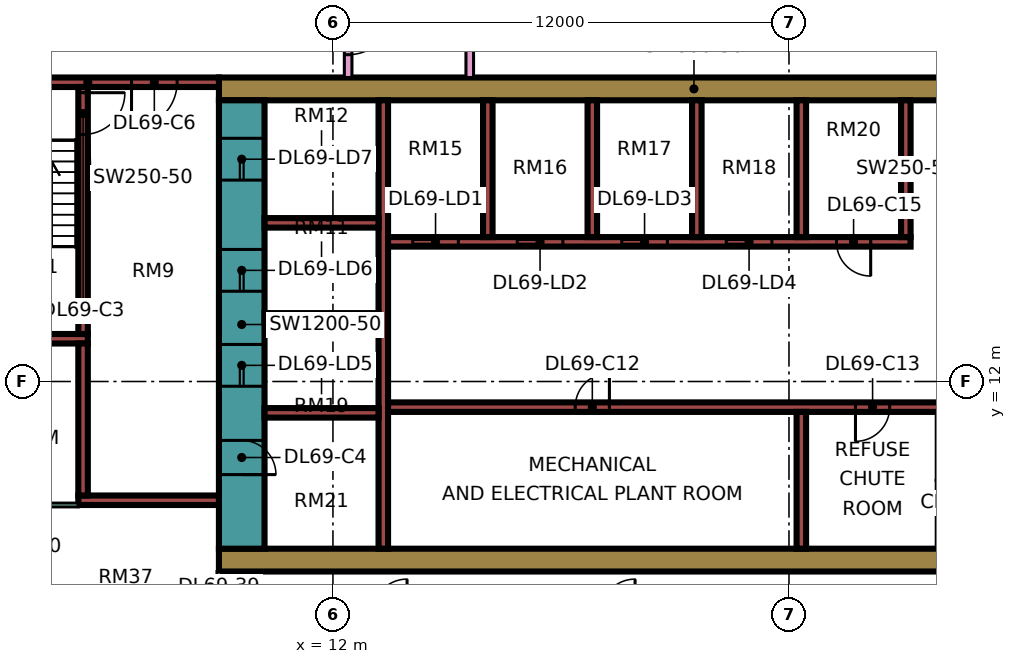
"""IFC4 building model, lengths in metres.
Left out: names, types, materials, properties, quantities, classifications, styles, units other than length and angle.
Written with IfcOpenShell. Run it as: python <this file> out.ifc"""

import sys

from ifc_helpers import new_model, si_unit, direction, frame, frame_2d, origin, place, context, subcontext, project, spatial, rectangle, extrude, element, fill, save


model = new_model("IFC4")
c1 = context("Model", 3, precision=1e-05, world=origin(), true_north=direction((0.0, 1.0)))
c2 = subcontext(c1, "Body", "Model", "MODEL_VIEW")
j1 = project(units=[si_unit("LENGTHUNIT", "METRE"), si_unit("PLANEANGLEUNIT", "RADIAN")], contexts=[c1])
p1 = place(None, origin())
s1 = spatial("IfcSite", under=j1, at=p1, CompositionType="ELEMENT")
p2 = place(p1, origin())
s2 = spatial("IfcBuilding", under=s1, at=p2, CompositionType="ELEMENT")
p3 = place(p2, frame((0.0, 0.0, 295.9)))
s3 = spatial("IfcBuildingStorey", under=s2, at=p3, CompositionType="ELEMENT", Elevation=295.9)
p4 = place(p3, frame((9.0, 7.3, 0.0), z_axis=(0.0, 0.0, 1.0), x_axis=(1.0, 0.0, 0.0)))
e1 = element("IfcWall", 1, at=p4, inside=s3, PredefinedType="SHEAR", context=c2, shape_type="SweptSolid", body=[
    extrude(rectangle(XDim=25.0, YDim=0.6, at=frame_2d((12.5, 0.0))), origin(), (0.0, 0.0, 1.0), 3.75),
])
p5 = place(p3, frame((9.0, 19.7, 0.0), z_axis=(0.0, 0.0, 1.0), x_axis=(1.0, 0.0, 0.0)))
e2 = element("IfcWall", 2, at=p5, inside=s3, PredefinedType="SHEAR", context=c2, shape_type="SweptSolid", body=[
    extrude(rectangle(XDim=25.0, YDim=0.6, at=frame_2d((12.5, 0.0))), origin(), (0.0, 0.0, 1.0), 3.75),
])
p6 = place(p5, frame((19.1, 0.0, 0.0)))
e3 = element("IfcOpeningElement", 3, at=p6, cuts=e2, PredefinedType="OPENING", context=c2, shape_type="SweptSolid", body=[
    extrude(rectangle(XDim=1.8, YDim=2.4, at=frame_2d((0.9, 1.2))), frame((0.0, 0.31, 0.0), z_axis=(0.0, -1.0, 0.0), x_axis=(1.0, 0.0, 0.0)), (0.0, 0.0, 1.0), 0.62),
])
p7 = place(p3, frame((9.6, 7.6, 0.0), z_axis=(0.0, 0.0, 1.0), x_axis=(0.0, 1.0, 0.0)))
e4 = element("IfcWall", 4, at=p7, inside=s3, PredefinedType="SHEAR", context=c2, shape_type="SweptSolid", body=[
    extrude(rectangle(XDim=11.8, YDim=1.2, at=frame_2d((5.9, 0.0))), origin(), (0.0, 0.0, 1.0), 3.75),
])
p8 = place(p7, frame((4.275, 0.0, 0.0)))
e5 = element("IfcOpeningElement", 5, at=p8, cuts=e4, PredefinedType="OPENING", context=c2, shape_type="SweptSolid", body=[
    extrude(rectangle(XDim=1.1, YDim=2.2, at=frame_2d((0.55, 1.1))), frame((0.0, 0.61, 0.0), z_axis=(0.0, -1.0, 0.0), x_axis=(1.0, 0.0, 0.0)), (0.0, 0.0, 1.0), 1.22),
])
p9 = place(p7, frame((6.775, 0.0, 0.0)))
e6 = element("IfcOpeningElement", 6, at=p9, cuts=e4, PredefinedType="OPENING", context=c2, shape_type="SweptSolid", body=[
    extrude(rectangle(XDim=1.1, YDim=2.2, at=frame_2d((0.55, 1.1))), frame((0.0, 0.61, 0.0), z_axis=(0.0, -1.0, 0.0), x_axis=(1.0, 0.0, 0.0)), (0.0, 0.0, 1.0), 1.22),
])
p10 = place(p7, frame((9.7, 0.0, 0.0)))
e7 = element("IfcOpeningElement", 7, at=p10, cuts=e4, PredefinedType="OPENING", context=c2, shape_type="SweptSolid", body=[
    extrude(rectangle(XDim=1.1, YDim=2.2, at=frame_2d((0.55, 1.1))), frame((0.0, 0.61, 0.0), z_axis=(0.0, -1.0, 0.0), x_axis=(1.0, 0.0, 0.0)), (0.0, 0.0, 1.0), 1.22),
])
p11 = place(p7, frame((1.95, 0.0, 0.0)))
e8 = element("IfcOpeningElement", 8, at=p11, cuts=e4, PredefinedType="OPENING", context=c2, shape_type="SweptSolid", body=[
    extrude(rectangle(XDim=0.9, YDim=2.1, at=frame_2d((0.45, 1.05))), frame((0.0, 0.61, 0.0), z_axis=(0.0, -1.0, 0.0), x_axis=(1.0, 0.0, 0.0)), (0.0, 0.0, 1.0), 1.22),
])
p12 = place(p3, frame((13.325, 7.6, 0.0), z_axis=(0.0, 0.0, 1.0), x_axis=(0.0, 1.0, 0.0)))
e9 = element("IfcWall", 9, at=p12, inside=s3, PredefinedType="SHEAR", context=c2, shape_type="SweptSolid", body=[
    extrude(rectangle(XDim=11.8, YDim=0.25, at=frame_2d((5.9, 0.0))), origin(), (0.0, 0.0, 1.0), 3.75),
])
p13 = place(p3, frame((13.45, 11.325, 0.0), z_axis=(0.0, 0.0, 1.0), x_axis=(1.0, 0.0, 0.0)))
e10 = element("IfcWall", 10, at=p13, inside=s3, PredefinedType="SHEAR", context=c2, shape_type="SweptSolid", body=[
    extrude(rectangle(XDim=19.95, YDim=0.25, at=frame_2d((9.975, 0.0))), origin(), (0.0, 0.0, 1.0), 3.75),
])
p14 = place(p13, frame((4.925, 0.0, 0.0)))
e11 = element("IfcOpeningElement", 11, at=p14, cuts=e10, PredefinedType="OPENING", context=c2, shape_type="SweptSolid", body=[
    extrude(rectangle(XDim=0.9, YDim=2.1, at=frame_2d((0.45, 1.05))), frame((0.0, 0.135, 0.0), z_axis=(0.0, -1.0, 0.0), x_axis=(1.0, 0.0, 0.0)), (0.0, 0.0, 1.0), 0.27),
])
p15 = place(p13, frame((12.3, 0.0, 0.0)))
e12 = element("IfcOpeningElement", 12, at=p15, cuts=e10, PredefinedType="OPENING", context=c2, shape_type="SweptSolid", body=[
    extrude(rectangle(XDim=0.9, YDim=2.1, at=frame_2d((0.45, 1.05))), frame((0.0, 0.135, 0.0), z_axis=(0.0, -1.0, 0.0), x_axis=(1.0, 0.0, 0.0)), (0.0, 0.0, 1.0), 0.27),
])
p16 = place(p13, frame((16.775, 0.0, 0.0)))
e13 = element("IfcOpeningElement", 13, at=p16, cuts=e10, PredefinedType="OPENING", context=c2, shape_type="SweptSolid", body=[
    extrude(rectangle(XDim=0.9, YDim=2.1, at=frame_2d((0.45, 1.05))), frame((0.0, 0.135, 0.0), z_axis=(0.0, -1.0, 0.0), x_axis=(1.0, 0.0, 0.0)), (0.0, 0.0, 1.0), 0.27),
])
p17 = place(p3, frame((13.45, 15.675, 0.0), z_axis=(0.0, 0.0, 1.0), x_axis=(1.0, 0.0, 0.0)))
e14 = element("IfcWall", 14, at=p17, inside=s3, PredefinedType="SHEAR", context=c2, shape_type="SweptSolid", body=[
    extrude(rectangle(XDim=13.75, YDim=0.25, at=frame_2d((6.875, 0.0))), origin(), (0.0, 0.0, 1.0), 3.75),
])
p18 = place(p17, frame((0.65, 0.0, 0.0)))
e15 = element("IfcOpeningElement", 15, at=p18, cuts=e14, PredefinedType="OPENING", context=c2, shape_type="SweptSolid", body=[
    extrude(rectangle(XDim=1.2, YDim=2.2, at=frame_2d((0.6, 1.1))), frame((0.0, 0.135, 0.0), z_axis=(0.0, -1.0, 0.0), x_axis=(1.0, 0.0, 0.0)), (0.0, 0.0, 1.0), 0.27),
])
p19 = place(p17, frame((3.4, 0.0, 0.0)))
e16 = element("IfcOpeningElement", 16, at=p19, cuts=e14, PredefinedType="OPENING", context=c2, shape_type="SweptSolid", body=[
    extrude(rectangle(XDim=1.2, YDim=2.2, at=frame_2d((0.6, 1.1))), frame((0.0, 0.135, 0.0), z_axis=(0.0, -1.0, 0.0), x_axis=(1.0, 0.0, 0.0)), (0.0, 0.0, 1.0), 0.27),
])
p20 = place(p17, frame((6.15, 0.0, 0.0)))
e17 = element("IfcOpeningElement", 17, at=p20, cuts=e14, PredefinedType="OPENING", context=c2, shape_type="SweptSolid", body=[
    extrude(rectangle(XDim=1.2, YDim=2.2, at=frame_2d((0.6, 1.1))), frame((0.0, 0.135, 0.0), z_axis=(0.0, -1.0, 0.0), x_axis=(1.0, 0.0, 0.0)), (0.0, 0.0, 1.0), 0.27),
])
p21 = place(p17, frame((8.9, 0.0, 0.0)))
e18 = element("IfcOpeningElement", 18, at=p21, cuts=e14, PredefinedType="OPENING", context=c2, shape_type="SweptSolid", body=[
    extrude(rectangle(XDim=1.2, YDim=2.2, at=frame_2d((0.6, 1.1))), frame((0.0, 0.135, 0.0), z_axis=(0.0, -1.0, 0.0), x_axis=(1.0, 0.0, 0.0)), (0.0, 0.0, 1.0), 0.27),
])
p22 = place(p17, frame((11.8, 0.0, 0.0)))
e19 = element("IfcOpeningElement", 19, at=p22, cuts=e14, PredefinedType="OPENING", context=c2, shape_type="SweptSolid", body=[
    extrude(rectangle(XDim=0.9, YDim=2.1, at=frame_2d((0.45, 1.05))), frame((0.0, 0.135, 0.0), z_axis=(0.0, -1.0, 0.0), x_axis=(1.0, 0.0, 0.0)), (0.0, 0.0, 1.0), 0.27),
])
for number, where, z_axis, x_axis in (
    (20, (10.2, 11.175, 0.0), (0.0, 0.0, 1.0), (1.0, 0.0, 0.0)),
    (21, (10.2, 13.675, 0.0), (0.0, 0.0, 1.0), (1.0, 0.0, 0.0)),
    (22, (10.2, 16.175, 0.0), (0.0, 0.0, 1.0), (1.0, 0.0, 0.0)),
):
    element("IfcWall", number, at=place(p3, frame(where, z_axis=z_axis, x_axis=x_axis)), inside=s3, PredefinedType="SHEAR", context=c2, shape_type="SweptSolid", body=[
        extrude(rectangle(XDim=3.0, YDim=0.25, at=frame_2d((1.5, 0.0))), origin(), (0.0, 0.0, 1.0), 3.75),
    ])
for number, where, z_axis, x_axis in (
    (23, (24.325, 7.6, 0.0), (0.0, 0.0, 1.0), (0.0, 1.0, 0.0)),
    (24, (16.075, 15.8, 0.0), (0.0, 0.0, 1.0), (0.0, 1.0, 0.0)),
    (25, (18.825, 15.8, 0.0), (0.0, 0.0, 1.0), (0.0, 1.0, 0.0)),
    (26, (21.575, 15.8, 0.0), (0.0, 0.0, 1.0), (0.0, 1.0, 0.0)),
    (27, (24.325, 15.8, 0.0), (0.0, 0.0, 1.0), (0.0, 1.0, 0.0)),
    (28, (27.075, 15.8, 0.0), (0.0, 0.0, 1.0), (0.0, 1.0, 0.0)),
):
    element("IfcWall", number, at=place(p3, frame(where, z_axis=z_axis, x_axis=x_axis)), inside=s3, PredefinedType="SHEAR", context=c2, shape_type="SweptSolid", body=[
        extrude(rectangle(XDim=3.6, YDim=0.25, at=frame_2d((1.8, 0.0))), origin(), (0.0, 0.0, 1.0), 3.75),
    ])
p23 = place(p3, frame((2.1, 19.875, 0.0), z_axis=(0.0, 0.0, 1.0), x_axis=(1.0, 0.0, 0.0)))
e29 = element("IfcWall", 29, at=p23, inside=s3, PredefinedType="SHEAR", context=c2, shape_type="SweptSolid", body=[
    extrude(rectangle(XDim=6.9, YDim=0.25, at=frame_2d((3.45, 0.0))), origin(), (0.0, 0.0, 1.0), 3.75),
])
p24 = place(p23, frame((1.175, 0.0, 0.0)))
e30 = element("IfcOpeningElement", 30, at=p24, cuts=e29, PredefinedType="OPENING", context=c2, shape_type="SweptSolid", body=[
    extrude(rectangle(XDim=1.1, YDim=2.2, at=frame_2d((0.55, 1.1))), frame((0.0, 0.135, 0.0), z_axis=(0.0, -1.0, 0.0), x_axis=(1.0, 0.0, 0.0)), (0.0, 0.0, 1.0), 0.27),
])
p25 = place(p23, frame((4.6, 0.0, 0.0)))
e31 = element("IfcOpeningElement", 31, at=p25, cuts=e29, PredefinedType="OPENING", context=c2, shape_type="SweptSolid", body=[
    extrude(rectangle(XDim=1.2, YDim=2.2, at=frame_2d((0.6, 1.1))), frame((0.0, 0.135, 0.0), z_axis=(0.0, -1.0, 0.0), x_axis=(1.0, 0.0, 0.0)), (0.0, 0.0, 1.0), 0.27),
])
p26 = place(p3, frame((2.1, 13.125, 0.0), z_axis=(0.0, 0.0, 1.0), x_axis=(1.0, 0.0, 0.0)))
e32 = element("IfcWall", 32, at=p26, inside=s3, PredefinedType="SHEAR", context=c2, shape_type="SweptSolid", body=[
    extrude(rectangle(XDim=3.45, YDim=0.25, at=frame_2d((1.725, 0.0))), origin(), (0.0, 0.0, 1.0), 3.75),
])
p27 = place(p3, frame((5.425, 13.25, 0.0), z_axis=(0.0, 0.0, 1.0), x_axis=(0.0, 1.0, 0.0)))
e33 = element("IfcWall", 33, at=p27, inside=s3, PredefinedType="SHEAR", context=c2, shape_type="SweptSolid", body=[
    extrude(rectangle(XDim=6.5, YDim=0.25, at=frame_2d((3.25, 0.0))), origin(), (0.0, 0.0, 1.0), 3.75),
])
p28 = place(p27, frame((5.25, 0.0, 0.0)))
e34 = element("IfcOpeningElement", 34, at=p28, cuts=e33, PredefinedType="OPENING", context=c2, shape_type="SweptSolid", body=[
    extrude(rectangle(XDim=1.1, YDim=2.2, at=frame_2d((0.55, 1.1))), frame((0.0, 0.135, 0.0), z_axis=(0.0, -1.0, 0.0), x_axis=(1.0, 0.0, 0.0)), (0.0, 0.0, 1.0), 0.27),
])
p29 = place(p3, frame((5.3, 8.875, 0.0), z_axis=(0.0, 0.0, 1.0), x_axis=(1.0, 0.0, 0.0)))
e35 = element("IfcWall", 35, at=p29, inside=s3, PredefinedType="SHEAR", context=c2, shape_type="SweptSolid", body=[
    extrude(rectangle(XDim=3.7, YDim=0.25, at=frame_2d((1.85, 0.0))), origin(), (0.0, 0.0, 1.0), 3.75),
])
p30 = place(p3, frame((5.425, 9.0, 0.0), z_axis=(0.0, 0.0, 1.0), x_axis=(0.0, 1.0, 0.0)))
e36 = element("IfcWall", 36, at=p30, inside=s3, PredefinedType="SHEAR", context=c2, shape_type="SweptSolid", body=[
    extrude(rectangle(XDim=4.0, YDim=0.25, at=frame_2d((2.0, 0.0))), origin(), (0.0, 0.0, 1.0), 3.75),
])
p31 = place(p3, frame((-1.447, 12.553, 0.0), z_axis=(0.0, 0.0, 1.0), x_axis=(0.707106781187, -0.707106781187, 0.0)))
e37 = element("IfcWall", 37, at=p31, inside=s3, PredefinedType="SOLIDWALL", context=c2, shape_type="SweptSolid", body=[
    extrude(rectangle(XDim=19.799, YDim=0.15, at=frame_2d((9.899, 0.0))), origin(), (0.0, 0.0, 1.0), 3.35),
])
p32 = place(p31, frame((2.212, 0.0, 0.45)))
e38 = element("IfcOpeningElement", 38, at=p32, cuts=e37, PredefinedType="OPENING", context=c2, shape_type="SweptSolid", body=[
    extrude(rectangle(XDim=3.0, YDim=2.4, at=frame_2d((1.5, 1.2))), frame((0.0, 0.085, 0.0), z_axis=(0.0, -1.0, 0.0), x_axis=(1.0, 0.0, 0.0)), (0.0, 0.0, 1.0), 0.17),
])
p33 = place(p31, frame((10.216, 0.0, 0.45)))
e39 = element("IfcOpeningElement", 39, at=p33, cuts=e37, PredefinedType="OPENING", context=c2, shape_type="SweptSolid", body=[
    extrude(rectangle(XDim=3.0, YDim=2.4, at=frame_2d((1.5, 1.2))), frame((0.0, 0.085, 0.0), z_axis=(0.0, -1.0, 0.0), x_axis=(1.0, 0.0, 0.0)), (0.0, 0.0, 1.0), 0.17),
])
p34 = place(p3, frame((2.461, 8.75, 0.0), z_axis=(0.0, 0.0, 1.0), x_axis=(1.0, 0.0, 0.0)))
e40 = element("IfcWall", 40, at=p34, inside=s3, PredefinedType="PARTITIONING", context=c2, shape_type="SweptSolid", body=[
    extrude(rectangle(XDim=2.839, YDim=0.1, at=frame_2d((1.419, 0.0))), origin(), (0.0, 0.0, 1.0), 3.35),
])
p35 = place(p34, frame((0.889, 0.0, 0.0)))
e41 = element("IfcOpeningElement", 41, at=p35, cuts=e40, PredefinedType="OPENING", context=c2, shape_type="SweptSolid", body=[
    extrude(rectangle(XDim=0.9, YDim=2.1, at=frame_2d((0.45, 1.05))), frame((0.0, 0.06, 0.0), z_axis=(0.0, -1.0, 0.0), x_axis=(1.0, 0.0, 0.0)), (0.0, 0.0, 1.0), 0.12),
])
p36 = place(p3, frame((9.0, 3.95, 0.0), z_axis=(0.0, 0.0, 1.0), x_axis=(0.0, 1.0, 0.0)))
e42 = element("IfcWall", 42, at=p36, inside=s3, PredefinedType="PARTITIONING", context=c2, shape_type="SweptSolid", body=[
    extrude(rectangle(XDim=3.05, YDim=0.1, at=frame_2d((1.525, 0.0))), origin(), (0.0, 0.0, 1.0), 3.35),
])
p37 = place(p36, frame((1.1, 0.0, 0.0)))
e43 = element("IfcOpeningElement", 43, at=p37, cuts=e42, PredefinedType="OPENING", context=c2, shape_type="SweptSolid", body=[
    extrude(rectangle(XDim=0.9, YDim=2.1, at=frame_2d((0.45, 1.05))), frame((0.0, 0.06, 0.0), z_axis=(0.0, -1.0, 0.0), x_axis=(1.0, 0.0, 0.0)), (0.0, 0.0, 1.0), 0.12),
])
p38 = place(p3, frame((12.4, 20.0, 0.0), z_axis=(0.0, 0.0, 1.0), x_axis=(0.0, 1.0, 0.0)))
e44 = element("IfcWall", 44, at=p38, inside=s3, PredefinedType="PARTITIONING", context=c2, shape_type="SweptSolid", body=[
    extrude(rectangle(XDim=33.926, YDim=0.2, at=frame_2d((16.963, 0.0))), origin(), (0.0, 0.0, 1.0), 3.35),
])
p39 = place(p38, frame((32.1, 0.0, 0.0)))
e45 = element("IfcOpeningElement", 45, at=p39, cuts=e44, PredefinedType="OPENING", context=c2, shape_type="SweptSolid", body=[
    extrude(rectangle(XDim=1.0, YDim=2.1, at=frame_2d((0.5, 1.05))), frame((0.0, 0.11, 0.0), z_axis=(0.0, -1.0, 0.0), x_axis=(1.0, 0.0, 0.0)), (0.0, 0.0, 1.0), 0.22),
])
p40 = place(p38, frame((0.6, 0.0, 0.0)))
e46 = element("IfcOpeningElement", 46, at=p40, cuts=e44, PredefinedType="OPENING", context=c2, shape_type="SweptSolid", body=[
    extrude(rectangle(XDim=1.2, YDim=2.1, at=frame_2d((0.6, 1.05))), frame((0.0, 0.11, 0.0), z_axis=(0.0, -1.0, 0.0), x_axis=(1.0, 0.0, 0.0)), (0.0, 0.0, 1.0), 0.22),
])
p41 = place(p38, frame((14.1, 0.0, 0.0)))
e47 = element("IfcOpeningElement", 47, at=p41, cuts=e44, PredefinedType="OPENING", context=c2, shape_type="SweptSolid", body=[
    extrude(rectangle(XDim=1.0, YDim=2.1, at=frame_2d((0.5, 1.05))), frame((0.0, 0.11, 0.0), z_axis=(0.0, -1.0, 0.0), x_axis=(1.0, 0.0, 0.0)), (0.0, 0.0, 1.0), 0.22),
])
p42 = place(p3, frame((15.6, 20.0, 0.0), z_axis=(0.0, 0.0, 1.0), x_axis=(0.0, 1.0, 0.0)))
e48 = element("IfcWall", 48, at=p42, inside=s3, PredefinedType="PARTITIONING", context=c2, shape_type="SweptSolid", body=[
    extrude(rectangle(XDim=27.775, YDim=0.2, at=frame_2d((13.887, 0.0))), origin(), (0.0, 0.0, 1.0), 3.35),
])
p43 = place(p42, frame((6.55, 0.0, 0.0)))
e49 = element("IfcOpeningElement", 49, at=p43, cuts=e48, PredefinedType="OPENING", context=c2, shape_type="SweptSolid", body=[
    extrude(rectangle(XDim=1.0, YDim=2.1, at=frame_2d((0.5, 1.05))), frame((0.0, 0.11, 0.0), z_axis=(0.0, -1.0, 0.0), x_axis=(1.0, 0.0, 0.0)), (0.0, 0.0, 1.0), 0.22),
])
p44 = place(p42, frame((12.25, 0.0, 0.0)))
e50 = element("IfcOpeningElement", 50, at=p44, cuts=e48, PredefinedType="OPENING", context=c2, shape_type="SweptSolid", body=[
    extrude(rectangle(XDim=1.6, YDim=2.1, at=frame_2d((0.8, 1.05))), frame((0.0, 0.11, 0.0), z_axis=(0.0, -1.0, 0.0), x_axis=(1.0, 0.0, 0.0)), (0.0, 0.0, 1.0), 0.22),
])
p45 = place(p42, frame((17.2, 0.0, 0.0)))
e51 = element("IfcOpeningElement", 51, at=p45, cuts=e48, PredefinedType="OPENING", context=c2, shape_type="SweptSolid", body=[
    extrude(rectangle(XDim=1.0, YDim=2.1, at=frame_2d((0.5, 1.05))), frame((0.0, 0.11, 0.0), z_axis=(0.0, -1.0, 0.0), x_axis=(1.0, 0.0, 0.0)), (0.0, 0.0, 1.0), 0.22),
])
p46 = place(p42, frame((1.15, 0.0, 0.0)))
e52 = element("IfcOpeningElement", 52, at=p46, cuts=e48, PredefinedType="OPENING", context=c2, shape_type="SweptSolid", body=[
    extrude(rectangle(XDim=1.8, YDim=2.1, at=frame_2d((0.9, 1.05))), frame((0.0, 0.11, 0.0), z_axis=(0.0, -1.0, 0.0), x_axis=(1.0, 0.0, 0.0)), (0.0, 0.0, 1.0), 0.22),
])
p47 = place(p42, frame((25.9, 0.0, 0.0)))
e53 = element("IfcOpeningElement", 53, at=p47, cuts=e48, PredefinedType="OPENING", context=c2, shape_type="SweptSolid", body=[
    extrude(rectangle(XDim=1.0, YDim=2.1, at=frame_2d((0.5, 1.05))), frame((0.0, 0.11, 0.0), z_axis=(0.0, -1.0, 0.0), x_axis=(1.0, 0.0, 0.0)), (0.0, 0.0, 1.0), 0.22),
])
p48 = place(p18, origin())
e54 = element("IfcDoor", 54, at=p48, inside=s3, OperationType="DOUBLE_DOOR_SLIDING", PredefinedType="DOOR", context=c2, shape_type="SweptSolid", body=[
    extrude(rectangle(XDim=1.2, YDim=2.2, at=frame_2d((0.6, 1.1))), frame((0.0, 0.025, 0.0), z_axis=(0.0, -1.0, 0.0), x_axis=(1.0, 0.0, 0.0)), (0.0, 0.0, 1.0), 0.05),
])
fill(e15, e54)
p49 = place(p19, origin())
e55 = element("IfcDoor", 55, at=p49, inside=s3, OperationType="DOUBLE_DOOR_SLIDING", PredefinedType="DOOR", context=c2, shape_type="SweptSolid", body=[
    extrude(rectangle(XDim=1.2, YDim=2.2, at=frame_2d((0.6, 1.1))), frame((0.0, 0.025, 0.0), z_axis=(0.0, -1.0, 0.0), x_axis=(1.0, 0.0, 0.0)), (0.0, 0.0, 1.0), 0.05),
])
fill(e16, e55)
p50 = place(p20, origin())
e56 = element("IfcDoor", 56, at=p50, inside=s3, OperationType="DOUBLE_DOOR_SLIDING", PredefinedType="DOOR", context=c2, shape_type="SweptSolid", body=[
    extrude(rectangle(XDim=1.2, YDim=2.2, at=frame_2d((0.6, 1.1))), frame((0.0, 0.025, 0.0), z_axis=(0.0, -1.0, 0.0), x_axis=(1.0, 0.0, 0.0)), (0.0, 0.0, 1.0), 0.05),
])
fill(e17, e56)
p51 = place(p21, origin())
e57 = element("IfcDoor", 57, at=p51, inside=s3, OperationType="DOUBLE_DOOR_SLIDING", PredefinedType="DOOR", context=c2, shape_type="SweptSolid", body=[
    extrude(rectangle(XDim=1.2, YDim=2.2, at=frame_2d((0.6, 1.1))), frame((0.0, 0.025, 0.0), z_axis=(0.0, -1.0, 0.0), x_axis=(1.0, 0.0, 0.0)), (0.0, 0.0, 1.0), 0.05),
])
fill(e18, e57)
p52 = place(p8, origin())
e58 = element("IfcDoor", 58, at=p52, inside=s3, OperationType="DOUBLE_DOOR_SLIDING", PredefinedType="DOOR", context=c2, shape_type="SweptSolid", body=[
    extrude(rectangle(XDim=1.1, YDim=2.2, at=frame_2d((0.55, 1.1))), frame((0.0, 0.025, 0.0), z_axis=(0.0, -1.0, 0.0), x_axis=(1.0, 0.0, 0.0)), (0.0, 0.0, 1.0), 0.05),
])
fill(e5, e58)
p53 = place(p9, origin())
e59 = element("IfcDoor", 59, at=p53, inside=s3, OperationType="DOUBLE_DOOR_SLIDING", PredefinedType="DOOR", context=c2, shape_type="SweptSolid", body=[
    extrude(rectangle(XDim=1.1, YDim=2.2, at=frame_2d((0.55, 1.1))), frame((0.0, 0.025, 0.0), z_axis=(0.0, -1.0, 0.0), x_axis=(1.0, 0.0, 0.0)), (0.0, 0.0, 1.0), 0.05),
])
fill(e6, e59)
p54 = place(p10, origin())
e60 = element("IfcDoor", 60, at=p54, inside=s3, OperationType="DOUBLE_DOOR_SLIDING", PredefinedType="DOOR", context=c2, shape_type="SweptSolid", body=[
    extrude(rectangle(XDim=1.1, YDim=2.2, at=frame_2d((0.55, 1.1))), frame((0.0, 0.025, 0.0), z_axis=(0.0, -1.0, 0.0), x_axis=(1.0, 0.0, 0.0)), (0.0, 0.0, 1.0), 0.05),
])
fill(e7, e60)
p55 = place(p28, origin())
e61 = element("IfcDoor", 61, at=p55, inside=s3, OperationType="SINGLE_SWING_RIGHT", PredefinedType="DOOR", context=c2, shape_type="SweptSolid", body=[
    extrude(rectangle(XDim=1.1, YDim=2.2, at=frame_2d((0.55, 1.1))), frame((0.0, 0.025, 0.0), z_axis=(0.0, -1.0, 0.0), x_axis=(1.0, 0.0, 0.0)), (0.0, 0.0, 1.0), 0.05),
])
fill(e34, e61)
p56 = place(p11, frame((0.9, 0.0, 0.0), z_axis=(0.0, 0.0, 1.0), x_axis=(-1.0, 0.0, 0.0)))
e62 = element("IfcDoor", 62, at=p56, inside=s3, OperationType="SINGLE_SWING_LEFT", PredefinedType="DOOR", context=c2, shape_type="SweptSolid", body=[
    extrude(rectangle(XDim=0.9, YDim=2.1, at=frame_2d((0.45, 1.05))), frame((0.0, 0.025, 0.0), z_axis=(0.0, -1.0, 0.0), x_axis=(1.0, 0.0, 0.0)), (0.0, 0.0, 1.0), 0.05),
])
fill(e8, e62)
p57 = place(p25, frame((1.2, 0.0, 0.0), z_axis=(0.0, 0.0, 1.0), x_axis=(-1.0, 0.0, 0.0)))
e63 = element("IfcDoor", 63, at=p57, inside=s3, OperationType="SINGLE_SWING_LEFT", PredefinedType="DOOR", context=c2, shape_type="SweptSolid", body=[
    extrude(rectangle(XDim=1.2, YDim=2.2, at=frame_2d((0.6, 1.1))), frame((0.0, 0.025, 0.0), z_axis=(0.0, -1.0, 0.0), x_axis=(1.0, 0.0, 0.0)), (0.0, 0.0, 1.0), 0.05),
])
fill(e31, e63)
p58 = place(p14, frame((0.9, 0.0, 0.0), z_axis=(0.0, 0.0, 1.0), x_axis=(-1.0, 0.0, 0.0)))
e64 = element("IfcDoor", 64, at=p58, inside=s3, OperationType="SINGLE_SWING_RIGHT", PredefinedType="DOOR", context=c2, shape_type="SweptSolid", body=[
    extrude(rectangle(XDim=0.9, YDim=2.1, at=frame_2d((0.45, 1.05))), frame((0.0, 0.025, 0.0), z_axis=(0.0, -1.0, 0.0), x_axis=(1.0, 0.0, 0.0)), (0.0, 0.0, 1.0), 0.05),
])
fill(e11, e64)
p59 = place(p15, frame((0.9, 0.0, 0.0), z_axis=(0.0, 0.0, 1.0), x_axis=(-1.0, 0.0, 0.0)))
e65 = element("IfcDoor", 65, at=p59, inside=s3, OperationType="SINGLE_SWING_LEFT", PredefinedType="DOOR", context=c2, shape_type="SweptSolid", body=[
    extrude(rectangle(XDim=0.9, YDim=2.1, at=frame_2d((0.45, 1.05))), frame((0.0, 0.025, 0.0), z_axis=(0.0, -1.0, 0.0), x_axis=(1.0, 0.0, 0.0)), (0.0, 0.0, 1.0), 0.05),
])
fill(e12, e65)
p60 = place(p22, origin())
e66 = element("IfcDoor", 66, at=p60, inside=s3, OperationType="SINGLE_SWING_RIGHT", PredefinedType="DOOR", context=c2, shape_type="SweptSolid", body=[
    extrude(rectangle(XDim=0.9, YDim=2.1, at=frame_2d((0.45, 1.05))), frame((0.0, 0.025, 0.0), z_axis=(0.0, -1.0, 0.0), x_axis=(1.0, 0.0, 0.0)), (0.0, 0.0, 1.0), 0.05),
])
fill(e19, e66)
p61 = place(p40, origin())
e67 = element("IfcDoor", 67, at=p61, inside=s3, OperationType="SINGLE_SWING_RIGHT", PredefinedType="DOOR", context=c2, shape_type="SweptSolid", body=[
    extrude(rectangle(XDim=1.2, YDim=2.1, at=frame_2d((0.6, 1.05))), frame((0.0, 0.025, 0.0), z_axis=(0.0, -1.0, 0.0), x_axis=(1.0, 0.0, 0.0)), (0.0, 0.0, 1.0), 0.05),
])
fill(e46, e67)
save(model, sys.argv[1])
